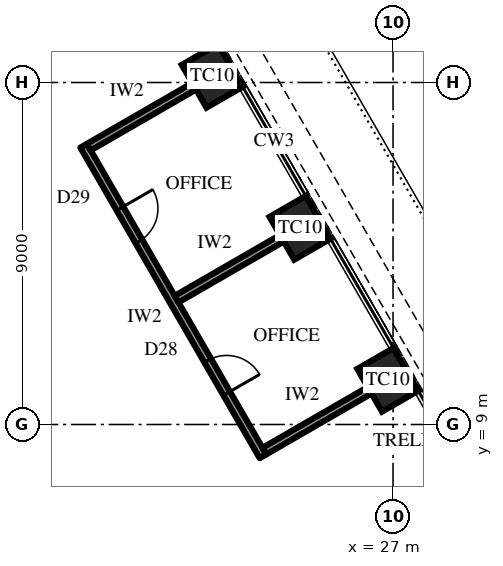
"""IFC4 building model, lengths in metres.
Left out: names, types, materials, properties, quantities, classifications, styles, units other than length and angle.
Written with IfcOpenShell. Run it as: python <this file> out.ifc"""

import sys

from ifc_helpers import new_model, si_unit, direction, frame, frame_2d, origin, origin_2d, place, context, subcontext, project, spatial, rectangle, extrude, element, fill, save


model = new_model("IFC4")
c1 = context("Model", 3, precision=1e-05, world=origin(), true_north=direction((0.0, 1.0)))
c2 = subcontext(c1, "Body", "Model", "MODEL_VIEW")
j1 = project(units=[si_unit("LENGTHUNIT", "METRE"), si_unit("PLANEANGLEUNIT", "RADIAN")], contexts=[c1])
p1 = place(None, origin())
s1 = spatial("IfcSite", under=j1, at=p1, CompositionType="ELEMENT")
p2 = place(p1, origin())
s2 = spatial("IfcBuilding", under=s1, at=p2, CompositionType="ELEMENT")
p3 = place(p2, frame((0.0, 0.0, 244.9)))
s3 = spatial("IfcBuildingStorey", under=s2, at=p3, CompositionType="ELEMENT", Elevation=244.9)
for number, where, z_axis, x_axis in (
    (1, (26.861, 10.175, 0.0), (0.0, 0.0, 1.0), (-0.5, 0.866, 0.0)),
    (2, (24.552, 14.175, 0.0), (0.0, 0.0, 1.0), (-0.5, 0.866, 0.0)),
    (3, (22.242, 18.175, 0.0), (0.0, 0.0, 1.0), (-0.5, 0.866, 0.0)),
):
    element("IfcColumn", number, at=place(p3, frame(where, z_axis=z_axis, x_axis=x_axis)), inside=s3, PredefinedType="COLUMN", context=c2, shape_type="SweptSolid", body=[
        extrude(rectangle(XDim=1.3, YDim=1.1, at=origin_2d()), origin(), (0.0, 0.0, 1.0), 4.2),
    ])
p4 = place(p3, frame((23.577, 8.163, 0.0), z_axis=(0.0, 0.0, 1.0), x_axis=(-0.499989672313, 0.866031366395, 0.0)))
e4 = element("IfcWall", 4, at=p4, inside=s3, PredefinedType="PARTITIONING", context=c2, shape_type="SweptSolid", body=[
    extrude(rectangle(XDim=9.438, YDim=0.2, at=frame_2d((4.719, 0.0))), origin(), (0.0, 0.0, 1.0), 4.0),
])
p5 = place(p4, frame((1.909, 0.0, 0.0)))
e5 = element("IfcOpeningElement", 5, at=p5, cuts=e4, PredefinedType="OPENING", context=c2, shape_type="SweptSolid", body=[
    extrude(rectangle(XDim=1.0, YDim=2.2, at=frame_2d((0.5, 1.1))), frame((0.0, 0.11, 0.0), z_axis=(0.0, -1.0, 0.0), x_axis=(1.0, 0.0, 0.0)), (0.0, 0.0, 1.0), 0.22),
])
p6 = place(p4, frame((6.528, 0.0, 0.0)))
e6 = element("IfcOpeningElement", 6, at=p6, cuts=e4, PredefinedType="OPENING", context=c2, shape_type="SweptSolid", body=[
    extrude(rectangle(XDim=1.0, YDim=2.2, at=frame_2d((0.5, 1.1))), frame((0.0, 0.11, 0.0), z_axis=(0.0, -1.0, 0.0), x_axis=(1.0, 0.0, 0.0)), (0.0, 0.0, 1.0), 0.22),
])
p7 = place(p3, frame((23.614, 8.3, 0.0), z_axis=(0.0, 0.0, 1.0), x_axis=(0.866061088033, 0.499938187974, 0.0)))
e7 = element("IfcWall", 7, at=p7, inside=s3, PredefinedType="PARTITIONING", context=c2, shape_type="SweptSolid", body=[
    extrude(rectangle(XDim=3.2, YDim=0.2, at=frame_2d((1.6, 0.0))), origin(), (0.0, 0.0, 1.0), 3.082),
])
for number, where, z_axis, x_axis in (
    (8, (21.304, 12.3, 0.0), (0.0, 0.0, 1.0), (0.866, 0.5, 0.0)),
    (9, (18.995, 16.3, 0.0), (0.0, 0.0, 1.0), (0.866, 0.5, 0.0)),
):
    element("IfcWall", number, at=place(p3, frame(where, z_axis=z_axis, x_axis=x_axis)), inside=s3, PredefinedType="PARTITIONING", context=c2, shape_type="SweptSolid", body=[
        extrude(rectangle(XDim=3.2, YDim=0.2, at=frame_2d((1.6, 0.0))), origin(), (0.0, 0.0, 1.0), 3.082),
    ])
p8 = place(p5, frame((1.0, 0.0, 0.0), z_axis=(0.0, 0.0, 1.0), x_axis=(-1.0, 0.0, 0.0)))
e10 = element("IfcDoor", 10, at=p8, inside=s3, OperationType="SINGLE_SWING_LEFT", PredefinedType="DOOR", context=c2, shape_type="SweptSolid", body=[
    extrude(rectangle(XDim=1.0, YDim=2.2, at=frame_2d((0.5, 1.1))), frame((0.0, 0.025, 0.0), z_axis=(0.0, -1.0, 0.0), x_axis=(1.0, 0.0, 0.0)), (0.0, 0.0, 1.0), 0.05),
])
fill(e5, e10)
p9 = place(p6, frame((1.0, 0.0, 0.0), z_axis=(0.0, 0.0, 1.0), x_axis=(-1.0, 0.0, 0.0)))
e11 = element("IfcDoor", 11, at=p9, inside=s3, OperationType="SINGLE_SWING_RIGHT", PredefinedType="DOOR", context=c2, shape_type="SweptSolid", body=[
    extrude(rectangle(XDim=1.0, YDim=2.2, at=frame_2d((0.5, 1.1))), frame((0.0, 0.025, 0.0), z_axis=(0.0, -1.0, 0.0), x_axis=(1.0, 0.0, 0.0)), (0.0, 0.0, 1.0), 0.05),
])
fill(e6, e11)
save(model, sys.argv[1])
